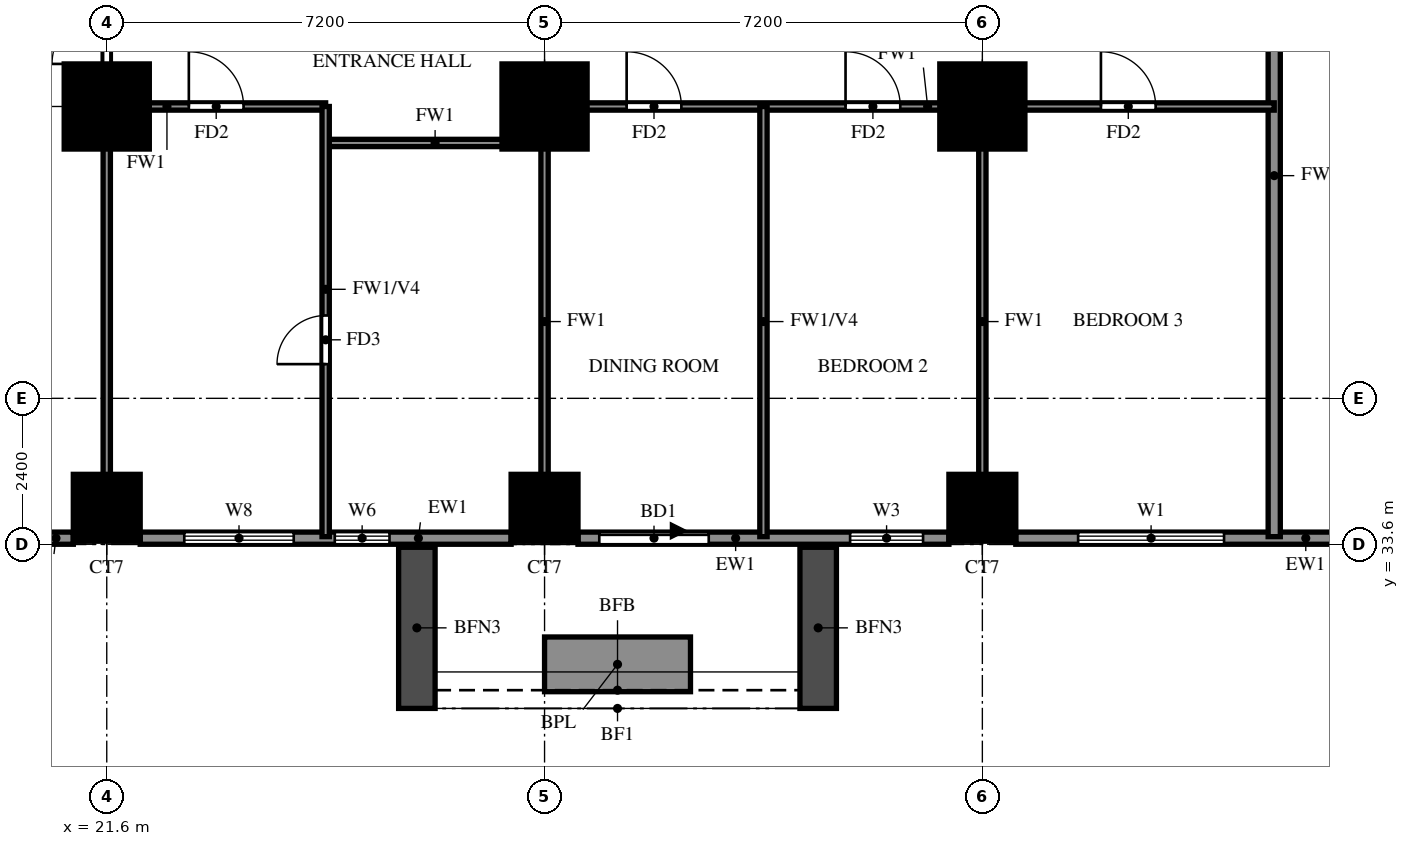
"""IFC4 building model, lengths in metres.
Left out: names, types, materials, properties, quantities, classifications, styles, units other than length and angle.
Written with IfcOpenShell. Run it as: python <this file> out.ifc"""

import sys

from ifc_helpers import new_model, si_unit, direction, frame, frame_2d, origin, origin_2d, place, context, subcontext, project, spatial, rectangle, extrude, source, transform, mapped, element, fill, save


model = new_model("IFC4")
c1 = context("Model", 3, precision=1e-05, world=origin(), true_north=direction((0.0, 1.0)))
c2 = subcontext(c1, "Body", "Model", "MODEL_VIEW")
j1 = project(units=[si_unit("LENGTHUNIT", "METRE"), si_unit("PLANEANGLEUNIT", "RADIAN")], contexts=[c1])
p1 = place(None, origin())
s1 = spatial("IfcSite", under=j1, at=p1, CompositionType="ELEMENT")
p2 = place(p1, origin())
s2 = spatial("IfcBuilding", under=s1, at=p2, CompositionType="ELEMENT")
p3 = place(p2, frame((0.0, 0.0, 51.5)))
s3 = spatial("IfcBuildingStorey", under=s2, at=p3, CompositionType="ELEMENT", Elevation=51.5)
m1 = source(origin(), c2, "Body", "SweptSolid", [
    extrude(rectangle(XDim=1.1, YDim=1.1, at=origin_2d()), origin(), (0.0, 0.0, 1.0), 3.18),
])
for number, where, z_axis, x_axis in (
    (1, (21.6, 34.2, 0.0), (0.0, 0.0, 1.0), (1.0, 0.0, 0.0)),
    (2, (28.8, 34.2, 0.0), (0.0, 0.0, 1.0), (1.0, 0.0, 0.0)),
    (3, (36.0, 34.2, 0.0), (0.0, 0.0, 1.0), (1.0, 0.0, 0.0)),
):
    element("IfcColumn", number, at=place(p3, frame(where, z_axis=z_axis, x_axis=x_axis)), inside=s3, PredefinedType="COLUMN", context=c2, shape_type="MappedRepresentation", body=[
        mapped(m1, transform((0.0, 0.0, 0.0))),
    ])
m2 = source(origin(), c2, "Body", "SweptSolid", [
    extrude(rectangle(XDim=1.4, YDim=1.4, at=origin_2d()), origin(), (0.0, 0.0, 1.0), 3.18),
])
for number, where, z_axis, x_axis in (
    (4, (21.6, 40.8, 0.0), (0.0, 0.0, 1.0), (1.0, 0.0, 0.0)),
    (5, (28.8, 40.8, 0.0), (0.0, 0.0, 1.0), (1.0, 0.0, 0.0)),
    (6, (36.0, 40.8, 0.0), (0.0, 0.0, 1.0), (1.0, 0.0, 0.0)),
):
    element("IfcColumn", number, at=place(p3, frame(where, z_axis=z_axis, x_axis=x_axis)), inside=s3, PredefinedType="COLUMN", context=c2, shape_type="MappedRepresentation", body=[
        mapped(m2, transform((0.0, 0.0, 0.0))),
    ])
p4 = place(p3, frame((18.2, 33.7, 0.0), z_axis=(0.0, 0.0, 1.0), x_axis=(1.0, 0.0, 0.0)))
e7 = element("IfcWall", 7, at=p4, inside=s3, PredefinedType="SOLIDWALL", context=c2, shape_type="SweptSolid", body=[
    extrude(rectangle(XDim=2.85, YDim=0.2, at=frame_2d((1.425, 0.0))), origin(), (0.0, 0.0, 1.0), 3.18),
])
p5 = place(p4, frame((0.525, 0.0, 0.6)))
e8 = element("IfcOpeningElement", 8, at=p5, cuts=e7, PredefinedType="OPENING", context=c2, shape_type="SweptSolid", body=[
    extrude(rectangle(XDim=1.8, YDim=2.4, at=frame_2d((0.9, 1.2))), frame((0.0, 0.11, 0.0), z_axis=(0.0, -1.0, 0.0), x_axis=(1.0, 0.0, 0.0)), (0.0, 0.0, 1.0), 0.22),
])
p6 = place(p3, frame((22.15, 33.7, 0.0), z_axis=(0.0, 0.0, 1.0), x_axis=(1.0, 0.0, 0.0)))
e9 = element("IfcWall", 9, at=p6, inside=s3, PredefinedType="SOLIDWALL", context=c2, shape_type="SweptSolid", body=[
    extrude(rectangle(XDim=6.1, YDim=0.2, at=frame_2d((3.05, 0.0))), origin(), (0.0, 0.0, 1.0), 3.18),
])
p7 = place(p6, frame((0.725, 0.0, 0.6)))
e10 = element("IfcOpeningElement", 10, at=p7, cuts=e9, PredefinedType="OPENING", context=c2, shape_type="SweptSolid", body=[
    extrude(rectangle(XDim=1.8, YDim=2.4, at=frame_2d((0.9, 1.2))), frame((0.0, 0.11, 0.0), z_axis=(0.0, -1.0, 0.0), x_axis=(1.0, 0.0, 0.0)), (0.0, 0.0, 1.0), 0.22),
])
p8 = place(p6, frame((3.2, 0.0, 1.5)))
e11 = element("IfcOpeningElement", 11, at=p8, cuts=e9, PredefinedType="OPENING", context=c2, shape_type="SweptSolid", body=[
    extrude(rectangle(XDim=0.9, YDim=0.9, at=frame_2d((0.45, 0.45))), frame((0.0, 0.11, 0.0), z_axis=(0.0, -1.0, 0.0), x_axis=(1.0, 0.0, 0.0)), (0.0, 0.0, 1.0), 0.22),
])
p9 = place(p3, frame((29.35, 33.7, 0.0), z_axis=(0.0, 0.0, 1.0), x_axis=(1.0, 0.0, 0.0)))
e12 = element("IfcWall", 12, at=p9, inside=s3, PredefinedType="SOLIDWALL", context=c2, shape_type="SweptSolid", body=[
    extrude(rectangle(XDim=6.1, YDim=0.2, at=frame_2d((3.05, 0.0))), origin(), (0.0, 0.0, 1.0), 3.18),
])
p10 = place(p9, frame((0.35, 0.0, 0.0)))
e13 = element("IfcOpeningElement", 13, at=p10, cuts=e12, PredefinedType="OPENING", context=c2, shape_type="SweptSolid", body=[
    extrude(rectangle(XDim=1.8, YDim=2.4, at=frame_2d((0.9, 1.2))), frame((0.0, 0.11, 0.0), z_axis=(0.0, -1.0, 0.0), x_axis=(1.0, 0.0, 0.0)), (0.0, 0.0, 1.0), 0.22),
])
p11 = place(p9, frame((4.475, 0.0, 0.6)))
e14 = element("IfcOpeningElement", 14, at=p11, cuts=e12, PredefinedType="OPENING", context=c2, shape_type="SweptSolid", body=[
    extrude(rectangle(XDim=1.2, YDim=2.4, at=frame_2d((0.6, 1.2))), frame((0.0, 0.11, 0.0), z_axis=(0.0, -1.0, 0.0), x_axis=(1.0, 0.0, 0.0)), (0.0, 0.0, 1.0), 0.22),
])
p12 = place(p3, frame((36.55, 33.7, 0.0), z_axis=(0.0, 0.0, 1.0), x_axis=(1.0, 0.0, 0.0)))
e15 = element("IfcWall", 15, at=p12, inside=s3, PredefinedType="SOLIDWALL", context=c2, shape_type="SweptSolid", body=[
    extrude(rectangle(XDim=5.45, YDim=0.2, at=frame_2d((2.725, 0.0))), origin(), (0.0, 0.0, 1.0), 3.18),
])
p13 = place(p12, frame((1.025, 0.0, 0.6)))
e16 = element("IfcOpeningElement", 16, at=p13, cuts=e15, PredefinedType="OPENING", context=c2, shape_type="SweptSolid", body=[
    extrude(rectangle(XDim=2.4, YDim=2.4, at=frame_2d((1.2, 1.2))), frame((0.0, 0.11, 0.0), z_axis=(0.0, -1.0, 0.0), x_axis=(1.0, 0.0, 0.0)), (0.0, 0.0, 1.0), 0.22),
])
for number, where, z_axis, x_axis in (
    (17, (26.7, 33.55, 0.0), (0.0, 0.0, 1.0), (0.0, -1.0, 0.0)),
    (18, (33.3, 33.55, 0.0), (0.0, 0.0, 1.0), (0.0, -1.0, 0.0)),
):
    element("IfcWall", number, at=place(p3, frame(where, z_axis=z_axis, x_axis=x_axis)), inside=s3, PredefinedType="SOLIDWALL", context=c2, shape_type="SweptSolid", body=[
        extrude(rectangle(XDim=2.65, YDim=0.6, at=frame_2d((1.325, 0.0))), origin(), (0.0, 0.0, 1.0), 2.85),
    ])
p14 = place(p3, frame((28.8, 31.625, 0.0), z_axis=(0.0, 0.0, 1.0), x_axis=(1.0, 0.0, 0.0)))
e19 = element("IfcWall", 19, at=p14, inside=s3, PredefinedType="SOLIDWALL", context=c2, shape_type="SweptSolid", body=[
    extrude(rectangle(XDim=2.4, YDim=0.9, at=frame_2d((1.2, 0.0))), origin(), (0.0, 0.0, 1.0), 0.9),
])
p15 = place(p3, frame((40.8, 33.725, 0.0), z_axis=(0.0, 0.0, 1.0), x_axis=(0.0, 1.0, 0.0)))
e20 = element("IfcWall", 20, at=p15, inside=s3, PredefinedType="SOLIDWALL", context=c2, shape_type="SweptSolid", body=[
    extrude(rectangle(XDim=11.875, YDim=0.2, at=frame_2d((5.938, 0.0))), origin(), (0.0, 0.0, 1.0), 2.28),
])
p16 = place(p3, frame((25.2, 40.2, 0.0), z_axis=(0.0, 0.0, 1.0), x_axis=(1.0, 0.0, 0.0)))
e21 = element("IfcWall", 21, at=p16, inside=s3, PredefinedType="PARTITIONING", context=c2, shape_type="SweptSolid", body=[
    extrude(rectangle(XDim=3.6, YDim=0.12, at=frame_2d((1.8, 0.0))), origin(), (0.0, 0.0, 1.0), 3.18),
])
p17 = place(p3, frame((21.6, 40.8, 0.0), z_axis=(0.0, 0.0, 1.0), x_axis=(1.0, 0.0, 0.0)))
e22 = element("IfcWall", 22, at=p17, inside=s3, PredefinedType="PARTITIONING", context=c2, shape_type="SweptSolid", body=[
    extrude(rectangle(XDim=3.6, YDim=0.12, at=frame_2d((1.8, 0.0))), origin(), (0.0, 0.0, 1.0), 3.18),
])
p18 = place(p17, frame((1.35, 0.0, 0.0)))
e23 = element("IfcOpeningElement", 23, at=p18, cuts=e22, PredefinedType="OPENING", context=c2, shape_type="SweptSolid", body=[
    extrude(rectangle(XDim=0.9, YDim=2.1, at=frame_2d((0.45, 1.05))), frame((0.0, 0.07, 0.0), z_axis=(0.0, -1.0, 0.0), x_axis=(1.0, 0.0, 0.0)), (0.0, 0.0, 1.0), 0.14),
])
p19 = place(p3, frame((28.8, 40.8, 0.0), z_axis=(0.0, 0.0, 1.0), x_axis=(1.0, 0.0, 0.0)))
e24 = element("IfcWall", 24, at=p19, inside=s3, PredefinedType="PARTITIONING", context=c2, shape_type="SweptSolid", body=[
    extrude(rectangle(XDim=12.0, YDim=0.12, at=frame_2d((6.0, 0.0))), origin(), (0.0, 0.0, 1.0), 3.18),
])
p20 = place(p19, frame((1.35, 0.0, 0.0)))
e25 = element("IfcOpeningElement", 25, at=p20, cuts=e24, PredefinedType="OPENING", context=c2, shape_type="SweptSolid", body=[
    extrude(rectangle(XDim=0.9, YDim=2.1, at=frame_2d((0.45, 1.05))), frame((0.0, 0.07, 0.0), z_axis=(0.0, -1.0, 0.0), x_axis=(1.0, 0.0, 0.0)), (0.0, 0.0, 1.0), 0.14),
])
p21 = place(p19, frame((4.95, 0.0, 0.0)))
e26 = element("IfcOpeningElement", 26, at=p21, cuts=e24, PredefinedType="OPENING", context=c2, shape_type="SweptSolid", body=[
    extrude(rectangle(XDim=0.9, YDim=2.1, at=frame_2d((0.45, 1.05))), frame((0.0, 0.07, 0.0), z_axis=(0.0, -1.0, 0.0), x_axis=(1.0, 0.0, 0.0)), (0.0, 0.0, 1.0), 0.14),
])
p22 = place(p19, frame((9.15, 0.0, 0.0)))
e27 = element("IfcOpeningElement", 27, at=p22, cuts=e24, PredefinedType="OPENING", context=c2, shape_type="SweptSolid", body=[
    extrude(rectangle(XDim=0.9, YDim=2.1, at=frame_2d((0.45, 1.05))), frame((0.0, 0.07, 0.0), z_axis=(0.0, -1.0, 0.0), x_axis=(1.0, 0.0, 0.0)), (0.0, 0.0, 1.0), 0.14),
])
p23 = place(p3, frame((21.6, 33.725, 0.0), z_axis=(0.0, 0.0, 1.0), x_axis=(0.0, 1.0, 0.0)))
e28 = element("IfcWall", 28, at=p23, inside=s3, PredefinedType="PARTITIONING", context=c2, shape_type="SweptSolid", body=[
    extrude(rectangle(XDim=17.875, YDim=0.12, at=frame_2d((8.938, 0.0))), origin(), (0.0, 0.0, 1.0), 3.18),
])
p24 = place(p23, frame((7.775, 0.0, 0.0)))
e29 = element("IfcOpeningElement", 29, at=p24, cuts=e28, PredefinedType="OPENING", context=c2, shape_type="SweptSolid", body=[
    extrude(rectangle(XDim=0.9, YDim=2.1, at=frame_2d((0.45, 1.05))), frame((0.0, 0.07, 0.0), z_axis=(0.0, -1.0, 0.0), x_axis=(1.0, 0.0, 0.0)), (0.0, 0.0, 1.0), 0.14),
])
p25 = place(p23, frame((15.625, 0.0, 0.0)))
e30 = element("IfcOpeningElement", 30, at=p25, cuts=e28, PredefinedType="OPENING", context=c2, shape_type="SweptSolid", body=[
    extrude(rectangle(XDim=0.9, YDim=2.1, at=frame_2d((0.45, 1.05))), frame((0.0, 0.07, 0.0), z_axis=(0.0, -1.0, 0.0), x_axis=(1.0, 0.0, 0.0)), (0.0, 0.0, 1.0), 0.14),
])
p26 = place(p3, frame((25.2, 33.725, 0.0), z_axis=(0.0, 0.0, 1.0), x_axis=(0.0, 1.0, 0.0)))
e31 = element("IfcWall", 31, at=p26, inside=s3, PredefinedType="PARTITIONING", context=c2, shape_type="SweptSolid", body=[
    extrude(rectangle(XDim=7.075, YDim=0.12, at=frame_2d((3.538, 0.0))), origin(), (0.0, 0.0, 1.0), 2.28),
])
p27 = place(p26, frame((2.837, 0.0, 0.0)))
e32 = element("IfcOpeningElement", 32, at=p27, cuts=e31, PredefinedType="OPENING", context=c2, shape_type="SweptSolid", body=[
    extrude(rectangle(XDim=0.8, YDim=2.1, at=frame_2d((0.4, 1.05))), frame((0.0, 0.07, 0.0), z_axis=(0.0, -1.0, 0.0), x_axis=(1.0, 0.0, 0.0)), (0.0, 0.0, 1.0), 0.14),
])
p28 = place(p3, frame((28.8, 33.725, 0.0), z_axis=(0.0, 0.0, 1.0), x_axis=(0.0, 1.0, 0.0)))
e33 = element("IfcWall", 33, at=p28, inside=s3, PredefinedType="PARTITIONING", context=c2, shape_type="SweptSolid", body=[
    extrude(rectangle(XDim=7.075, YDim=0.12, at=frame_2d((3.538, 0.0))), origin(), (0.0, 0.0, 1.0), 3.18),
])
p29 = place(p3, frame((32.4, 33.725, 0.0), z_axis=(0.0, 0.0, 1.0), x_axis=(0.0, 1.0, 0.0)))
e34 = element("IfcWall", 34, at=p29, inside=s3, PredefinedType="PARTITIONING", context=c2, shape_type="SweptSolid", body=[
    extrude(rectangle(XDim=7.075, YDim=0.12, at=frame_2d((3.538, 0.0))), origin(), (0.0, 0.0, 1.0), 2.28),
])
p30 = place(p3, frame((36.0, 33.725, 0.0), z_axis=(0.0, 0.0, 1.0), x_axis=(0.0, 1.0, 0.0)))
e35 = element("IfcWall", 35, at=p30, inside=s3, PredefinedType="PARTITIONING", context=c2, shape_type="SweptSolid", body=[
    extrude(rectangle(XDim=7.075, YDim=0.12, at=frame_2d((3.538, 0.0))), origin(), (0.0, 0.0, 1.0), 3.18),
])
p31 = place(p7, origin())
e36 = element("IfcWindow", 36, at=p31, inside=s3, PartitioningType="DOUBLE_PANEL_VERTICAL", PredefinedType="WINDOW", context=c2, shape_type="SweptSolid", body=[
    extrude(rectangle(XDim=1.8, YDim=2.4, at=frame_2d((0.9, 1.2))), frame((0.0, 0.03, 0.0), z_axis=(0.0, -1.0, 0.0), x_axis=(1.0, 0.0, 0.0)), (0.0, 0.0, 1.0), 0.06),
])
fill(e10, e36)
p32 = place(p8, origin())
e37 = element("IfcWindow", 37, at=p32, inside=s3, PartitioningType="SINGLE_PANEL", PredefinedType="WINDOW", context=c2, shape_type="SweptSolid", body=[
    extrude(rectangle(XDim=0.9, YDim=0.9, at=frame_2d((0.45, 0.45))), frame((0.0, 0.03, 0.0), z_axis=(0.0, -1.0, 0.0), x_axis=(1.0, 0.0, 0.0)), (0.0, 0.0, 1.0), 0.06),
])
fill(e11, e37)
p33 = place(p10, origin())
e38 = element("IfcDoor", 38, at=p33, inside=s3, OperationType="DOUBLE_DOOR_SLIDING", PredefinedType="DOOR", context=c2, shape_type="SweptSolid", body=[
    extrude(rectangle(XDim=1.8, YDim=2.4, at=frame_2d((0.9, 1.2))), frame((0.0, 0.025, 0.0), z_axis=(0.0, -1.0, 0.0), x_axis=(1.0, 0.0, 0.0)), (0.0, 0.0, 1.0), 0.05),
])
fill(e13, e38)
p34 = place(p11, origin())
e39 = element("IfcWindow", 39, at=p34, inside=s3, PartitioningType="SINGLE_PANEL", PredefinedType="WINDOW", context=c2, shape_type="SweptSolid", body=[
    extrude(rectangle(XDim=1.2, YDim=2.4, at=frame_2d((0.6, 1.2))), frame((0.0, 0.03, 0.0), z_axis=(0.0, -1.0, 0.0), x_axis=(1.0, 0.0, 0.0)), (0.0, 0.0, 1.0), 0.06),
])
fill(e14, e39)
p35 = place(p13, origin())
e40 = element("IfcWindow", 40, at=p35, inside=s3, PartitioningType="DOUBLE_PANEL_VERTICAL", PredefinedType="WINDOW", context=c2, shape_type="SweptSolid", body=[
    extrude(rectangle(XDim=2.4, YDim=2.4, at=frame_2d((1.2, 1.2))), frame((0.0, 0.03, 0.0), z_axis=(0.0, -1.0, 0.0), x_axis=(1.0, 0.0, 0.0)), (0.0, 0.0, 1.0), 0.06),
])
fill(e16, e40)
p36 = place(p24, origin())
e41 = element("IfcDoor", 41, at=p36, inside=s3, OperationType="SINGLE_SWING_RIGHT", PredefinedType="DOOR", context=c2, shape_type="SweptSolid", body=[
    extrude(rectangle(XDim=0.9, YDim=2.1, at=frame_2d((0.45, 1.05))), frame((0.0, 0.025, 0.0), z_axis=(0.0, -1.0, 0.0), x_axis=(1.0, 0.0, 0.0)), (0.0, 0.0, 1.0), 0.05),
])
fill(e29, e41)
p37 = place(p18, origin())
e42 = element("IfcDoor", 42, at=p37, inside=s3, OperationType="SINGLE_SWING_LEFT", PredefinedType="DOOR", context=c2, shape_type="SweptSolid", body=[
    extrude(rectangle(XDim=0.9, YDim=2.1, at=frame_2d((0.45, 1.05))), frame((0.0, 0.025, 0.0), z_axis=(0.0, -1.0, 0.0), x_axis=(1.0, 0.0, 0.0)), (0.0, 0.0, 1.0), 0.05),
])
fill(e23, e42)
p38 = place(p27, origin())
e43 = element("IfcDoor", 43, at=p38, inside=s3, OperationType="SINGLE_SWING_RIGHT", PredefinedType="DOOR", context=c2, shape_type="SweptSolid", body=[
    extrude(rectangle(XDim=0.8, YDim=2.1, at=frame_2d((0.4, 1.05))), frame((0.0, 0.025, 0.0), z_axis=(0.0, -1.0, 0.0), x_axis=(1.0, 0.0, 0.0)), (0.0, 0.0, 1.0), 0.05),
])
fill(e32, e43)
p39 = place(p20, origin())
e44 = element("IfcDoor", 44, at=p39, inside=s3, OperationType="SINGLE_SWING_LEFT", PredefinedType="DOOR", context=c2, shape_type="SweptSolid", body=[
    extrude(rectangle(XDim=0.9, YDim=2.1, at=frame_2d((0.45, 1.05))), frame((0.0, 0.025, 0.0), z_axis=(0.0, -1.0, 0.0), x_axis=(1.0, 0.0, 0.0)), (0.0, 0.0, 1.0), 0.05),
])
fill(e25, e44)
p40 = place(p21, origin())
e45 = element("IfcDoor", 45, at=p40, inside=s3, OperationType="SINGLE_SWING_LEFT", PredefinedType="DOOR", context=c2, shape_type="SweptSolid", body=[
    extrude(rectangle(XDim=0.9, YDim=2.1, at=frame_2d((0.45, 1.05))), frame((0.0, 0.025, 0.0), z_axis=(0.0, -1.0, 0.0), x_axis=(1.0, 0.0, 0.0)), (0.0, 0.0, 1.0), 0.05),
])
fill(e26, e45)
p41 = place(p22, origin())
e46 = element("IfcDoor", 46, at=p41, inside=s3, OperationType="SINGLE_SWING_RIGHT", PredefinedType="DOOR", context=c2, shape_type="SweptSolid", body=[
    extrude(rectangle(XDim=0.9, YDim=2.1, at=frame_2d((0.45, 1.05))), frame((0.0, 0.025, 0.0), z_axis=(0.0, -1.0, 0.0), x_axis=(1.0, 0.0, 0.0)), (0.0, 0.0, 1.0), 0.05),
])
fill(e27, e46)
save(model, sys.argv[1])
